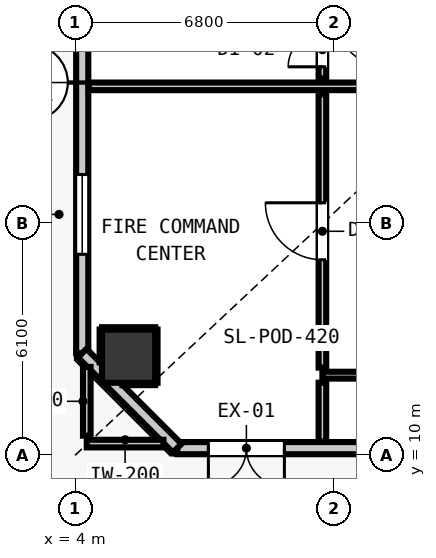
"""IFC4 building model, lengths in metres.
Left out: names, types, materials, properties, quantities, classifications, styles, units other than length and angle.
Written with IfcOpenShell. Run it as: python <this file> out.ifc"""

import sys

from ifc_helpers import new_model, si_unit, direction, frame, frame_2d, origin, origin_2d, place, context, subcontext, project, spatial, rectangle, extrude, element, fill, save


model = new_model("IFC4")
c1 = context("Model", 3, precision=1e-05, world=origin(), true_north=direction((0.0, 1.0)))
c2 = subcontext(c1, "Body", "Model", "MODEL_VIEW")
j1 = project(units=[si_unit("LENGTHUNIT", "METRE"), si_unit("PLANEANGLEUNIT", "RADIAN")], contexts=[c1])
p1 = place(None, origin())
s1 = spatial("IfcSite", under=j1, at=p1, CompositionType="ELEMENT")
p2 = place(p1, origin())
s2 = spatial("IfcBuilding", under=s1, at=p2, CompositionType="ELEMENT")
p3 = place(p2, origin())
s3 = spatial("IfcBuildingStorey", under=s2, at=p3, CompositionType="ELEMENT", Elevation=0.0)
p4 = place(p3, frame((5.4, 12.6, 0.0), z_axis=(0.0, 0.0, 1.0), x_axis=(1.0, 0.0, 0.0)))
e1 = element("IfcColumn", 1, at=p4, inside=s3, PredefinedType="COLUMN", context=c2, shape_type="SweptSolid", body=[
    extrude(rectangle(XDim=1.4, YDim=1.4, at=origin_2d()), origin(), (0.0, 0.0, 1.0), 5.2),
])
p5 = place(p3, frame((4.18, 12.68, 0.0), z_axis=(0.0, 0.0, 1.0), x_axis=(0.0, 1.0, 0.0)))
e2 = element("IfcWall", 2, at=p5, inside=s3, PredefinedType="STANDARD", context=c2, shape_type="SweptSolid", body=[
    extrude(rectangle(XDim=35.84, YDim=0.32, at=frame_2d((17.92, 0.0))), origin(), (0.0, 0.0, 1.0), 4.92),
])
p6 = place(p5, frame((9.87, 0.0, 0.0)))
e3 = element("IfcOpeningElement", 3, at=p6, cuts=e2, PredefinedType="OPENING", context=c2, shape_type="SweptSolid", body=[
    extrude(rectangle(XDim=1.8, YDim=2.4, at=frame_2d((0.9, 1.2))), frame((0.0, 0.17, 0.0), z_axis=(0.0, -1.0, 0.0), x_axis=(1.0, 0.0, 0.0)), (0.0, 0.0, 1.0), 0.34),
])
p7 = place(p5, frame((22.32, 0.0, 0.0)))
e4 = element("IfcOpeningElement", 4, at=p7, cuts=e2, PredefinedType="OPENING", context=c2, shape_type="SweptSolid", body=[
    extrude(rectangle(XDim=2.0, YDim=2.4, at=frame_2d((1.0, 1.2))), frame((0.0, 0.17, 0.0), z_axis=(0.0, -1.0, 0.0), x_axis=(1.0, 0.0, 0.0)), (0.0, 0.0, 1.0), 0.34),
])
p8 = place(p5, frame((30.72, 0.0, 0.0)))
e5 = element("IfcOpeningElement", 5, at=p8, cuts=e2, PredefinedType="OPENING", context=c2, shape_type="SweptSolid", body=[
    extrude(rectangle(XDim=3.6, YDim=2.8, at=frame_2d((1.8, 1.4))), frame((0.0, 0.17, 0.0), z_axis=(0.0, -1.0, 0.0), x_axis=(1.0, 0.0, 0.0)), (0.0, 0.0, 1.0), 0.34),
])
p9 = place(p5, frame((2.6, 0.0, 0.9)))
e6 = element("IfcOpeningElement", 6, at=p9, cuts=e2, PredefinedType="OPENING", context=c2, shape_type="SweptSolid", body=[
    extrude(rectangle(XDim=2.1, YDim=1.9, at=frame_2d((1.05, 0.95))), frame((0.0, 0.17, 0.0), z_axis=(0.0, -1.0, 0.0), x_axis=(1.0, 0.0, 0.0)), (0.0, 0.0, 1.0), 0.34),
])
p10 = place(p3, frame((14.74, 10.18, 0.0), z_axis=(0.0, 0.0, 1.0), x_axis=(-1.0, 0.0, 0.0)))
e7 = element("IfcWall", 7, at=p10, inside=s3, PredefinedType="STANDARD", context=c2, shape_type="SweptSolid", body=[
    extrude(rectangle(XDim=8.06, YDim=0.32, at=frame_2d((4.03, 0.0))), origin(), (0.0, 0.0, 1.0), 4.92),
])
p11 = place(p10, frame((5.24, 0.0, 0.0)))
e8 = element("IfcOpeningElement", 8, at=p11, cuts=e7, PredefinedType="OPENING", context=c2, shape_type="SweptSolid", body=[
    extrude(rectangle(XDim=2.0, YDim=2.4, at=frame_2d((1.0, 1.2))), frame((0.0, 0.17, 0.0), z_axis=(0.0, -1.0, 0.0), x_axis=(1.0, 0.0, 0.0)), (0.0, 0.0, 1.0), 0.34),
])
p12 = place(p3, frame((6.68, 10.18, 0.0), z_axis=(0.0, 0.0, 1.0), x_axis=(-0.707106781187, 0.707106781187, 0.0)))
e9 = element("IfcWall", 9, at=p12, inside=s3, PredefinedType="STANDARD", context=c2, shape_type="SweptSolid", body=[
    extrude(rectangle(XDim=3.536, YDim=0.32, at=frame_2d((1.768, 0.0))), origin(), (0.0, 0.0, 1.0), 4.92),
])
p13 = place(p3, frame((4.3, 10.3, 0.0), z_axis=(0.0, 0.0, 1.0), x_axis=(1.0, 0.0, 0.0)))
e10 = element("IfcWall", 10, at=p13, inside=s3, PredefinedType="PARTITIONING", context=c2, shape_type="SweptSolid", body=[
    extrude(rectangle(XDim=2.017, YDim=0.2, at=frame_2d((1.008, 0.0))), origin(), (0.0, 0.0, 1.0), 4.92),
])
p14 = place(p3, frame((4.352, 19.7, 0.0), z_axis=(0.0, 0.0, 1.0), x_axis=(1.0, 0.0, 0.0)))
e11 = element("IfcWall", 11, at=p14, inside=s3, PredefinedType="PARTITIONING", context=c2, shape_type="SweptSolid", body=[
    extrude(rectangle(XDim=43.296, YDim=0.2, at=frame_2d((21.648, 0.0))), origin(), (0.0, 0.0, 1.0), 4.92),
])
p15 = place(p14, frame((19.823, 0.0, 0.0)))
e12 = element("IfcOpeningElement", 12, at=p15, cuts=e11, PredefinedType="OPENING", context=c2, shape_type="SweptSolid", body=[
    extrude(rectangle(XDim=1.4, YDim=2.15, at=frame_2d((0.7, 1.075))), frame((0.0, 0.11, 0.0), z_axis=(0.0, -1.0, 0.0), x_axis=(1.0, 0.0, 0.0)), (0.0, 0.0, 1.0), 0.22),
])
p16 = place(p14, frame((36.848, 0.0, 0.0)))
e13 = element("IfcOpeningElement", 13, at=p16, cuts=e11, PredefinedType="OPENING", context=c2, shape_type="SweptSolid", body=[
    extrude(rectangle(XDim=1.4, YDim=2.15, at=frame_2d((0.7, 1.075))), frame((0.0, 0.11, 0.0), z_axis=(0.0, -1.0, 0.0), x_axis=(1.0, 0.0, 0.0)), (0.0, 0.0, 1.0), 0.22),
])
p17 = place(p3, frame((10.5, 12.1, 0.0), z_axis=(0.0, 0.0, 1.0), x_axis=(1.0, 0.0, 0.0)))
e14 = element("IfcWall", 14, at=p17, inside=s3, PredefinedType="PARTITIONING", context=c2, shape_type="SweptSolid", body=[
    extrude(rectangle(XDim=2.08, YDim=0.18, at=frame_2d((1.04, 0.0))), origin(), (0.0, 0.0, 1.0), 4.92),
])
p18 = place(p3, frame((4.3, 10.508, 0.0), z_axis=(0.0, 0.0, 1.0), x_axis=(0.0, 1.0, 0.0)))
e15 = element("IfcWall", 15, at=p18, inside=s3, PredefinedType="PARTITIONING", context=c2, shape_type="SweptSolid", body=[
    extrude(rectangle(XDim=1.809, YDim=0.2, at=frame_2d((0.904, 0.0))), origin(), (0.0, 0.0, 1.0), 4.92),
])
p19 = place(p3, frame((10.5, 10.352, 0.0), z_axis=(0.0, 0.0, 1.0), x_axis=(0.0, 1.0, 0.0)))
e16 = element("IfcWall", 16, at=p19, inside=s3, PredefinedType="PARTITIONING", context=c2, shape_type="SweptSolid", body=[
    extrude(rectangle(XDim=1.55, YDim=0.2, at=frame_2d((0.775, 0.0))), origin(), (0.0, 0.0, 1.0), 4.92),
])
p20 = place(p3, frame((10.5, 12.298, 0.0), z_axis=(0.0, 0.0, 1.0), x_axis=(0.0, 1.0, 0.0)))
e17 = element("IfcWall", 17, at=p20, inside=s3, PredefinedType="PARTITIONING", context=c2, shape_type="SweptSolid", body=[
    extrude(rectangle(XDim=7.194, YDim=0.2, at=frame_2d((3.597, 0.0))), origin(), (0.0, 0.0, 1.0), 4.92),
])
p21 = place(p20, frame((2.838, 0.0, 0.0)))
e18 = element("IfcOpeningElement", 18, at=p21, cuts=e17, PredefinedType="OPENING", context=c2, shape_type="SweptSolid", body=[
    extrude(rectangle(XDim=1.5, YDim=2.15, at=frame_2d((0.75, 1.075))), frame((0.0, 0.11, 0.0), z_axis=(0.0, -1.0, 0.0), x_axis=(1.0, 0.0, 0.0)), (0.0, 0.0, 1.0), 0.22),
])
p22 = place(p3, frame((10.5, 19.908, 0.0), z_axis=(0.0, 0.0, 1.0), x_axis=(0.0, 1.0, 0.0)))
e19 = element("IfcWall", 19, at=p22, inside=s3, PredefinedType="PARTITIONING", context=c2, shape_type="SweptSolid", body=[
    extrude(rectangle(XDim=1.464, YDim=0.2, at=frame_2d((0.732, 0.0))), origin(), (0.0, 0.0, 1.0), 4.92),
])
p23 = place(p22, frame((0.306, 0.0, 0.0)))
e20 = element("IfcOpeningElement", 20, at=p23, cuts=e19, PredefinedType="OPENING", context=c2, shape_type="SweptSolid", body=[
    extrude(rectangle(XDim=0.9, YDim=2.1, at=frame_2d((0.45, 1.05))), frame((0.0, 0.11, 0.0), z_axis=(0.0, -1.0, 0.0), x_axis=(1.0, 0.0, 0.0)), (0.0, 0.0, 1.0), 0.22),
])
p24 = place(p3, frame((5.239, 11.868, 0.0), z_axis=(0.0, 0.0, 1.0), x_axis=(1.0, 0.0, 0.0)))
e21 = element("IfcWall", 21, at=p24, inside=s3, PredefinedType="PARTITIONING", context=c2, shape_type="SweptSolid", body=[
    extrude(rectangle(XDim=0.861, YDim=0.06, at=frame_2d((0.431, 0.0))), origin(), (0.0, 0.0, 1.0), 1.45),
])
p25 = place(p3, frame((4.7, 13.332, 0.0), z_axis=(0.0, 0.0, 1.0), x_axis=(1.0, 0.0, 0.0)))
e22 = element("IfcWall", 22, at=p25, inside=s3, PredefinedType="PARTITIONING", context=c2, shape_type="SweptSolid", body=[
    extrude(rectangle(XDim=1.4, YDim=0.06, at=frame_2d((0.7, 0.0))), origin(), (0.0, 0.0, 1.0), 1.45),
])
p26 = place(p3, frame((4.668, 12.439, 0.0), z_axis=(0.0, 0.0, 1.0), x_axis=(0.0, 1.0, 0.0)))
e23 = element("IfcWall", 23, at=p26, inside=s3, PredefinedType="PARTITIONING", context=c2, shape_type="SweptSolid", body=[
    extrude(rectangle(XDim=0.861, YDim=0.06, at=frame_2d((0.431, 0.0))), origin(), (0.0, 0.0, 1.0), 1.45),
])
p27 = place(p3, frame((6.132, 11.9, 0.0), z_axis=(0.0, 0.0, 1.0), x_axis=(0.0, 1.0, 0.0)))
e24 = element("IfcWall", 24, at=p27, inside=s3, PredefinedType="PARTITIONING", context=c2, shape_type="SweptSolid", body=[
    extrude(rectangle(XDim=1.4, YDim=0.06, at=frame_2d((0.7, 0.0))), origin(), (0.0, 0.0, 1.0), 1.45),
])
p28 = place(p9, origin())
e25 = element("IfcWindow", 25, at=p28, inside=s3, PartitioningType="SINGLE_PANEL", PredefinedType="WINDOW", context=c2, shape_type="SweptSolid", body=[
    extrude(rectangle(XDim=2.1, YDim=1.9, at=frame_2d((1.05, 0.95))), frame((0.0, 0.03, 0.0), z_axis=(0.0, -1.0, 0.0), x_axis=(1.0, 0.0, 0.0)), (0.0, 0.0, 1.0), 0.06),
])
fill(e6, e25)
p29 = place(p11, origin())
e26 = element("IfcDoor", 26, at=p29, inside=s3, OperationType="DOUBLE_DOOR_SINGLE_SWING", PredefinedType="DOOR", context=c2, shape_type="SweptSolid", body=[
    extrude(rectangle(XDim=2.0, YDim=2.4, at=frame_2d((1.0, 1.2))), frame((0.0, 0.025, 0.0), z_axis=(0.0, -1.0, 0.0), x_axis=(1.0, 0.0, 0.0)), (0.0, 0.0, 1.0), 0.05),
])
fill(e8, e26)
p30 = place(p21, origin())
e27 = element("IfcDoor", 27, at=p30, inside=s3, OperationType="SINGLE_SWING_RIGHT", PredefinedType="DOOR", context=c2, shape_type="SweptSolid", body=[
    extrude(rectangle(XDim=1.5, YDim=2.15, at=frame_2d((0.75, 1.075))), frame((0.0, 0.025, 0.0), z_axis=(0.0, -1.0, 0.0), x_axis=(1.0, 0.0, 0.0)), (0.0, 0.0, 1.0), 0.05),
])
fill(e18, e27)
p31 = place(p23, origin())
e28 = element("IfcDoor", 28, at=p31, inside=s3, OperationType="SINGLE_SWING_LEFT", PredefinedType="DOOR", context=c2, shape_type="SweptSolid", body=[
    extrude(rectangle(XDim=0.9, YDim=2.1, at=frame_2d((0.45, 1.05))), frame((0.0, 0.025, 0.0), z_axis=(0.0, -1.0, 0.0), x_axis=(1.0, 0.0, 0.0)), (0.0, 0.0, 1.0), 0.05),
])
fill(e20, e28)
save(model, sys.argv[1])
